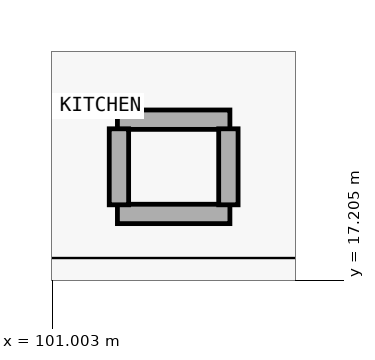
"""IFC4 building model, lengths in metres.
Left out: names, types, materials, properties, quantities, classifications, styles, units other than length and angle.
Written with IfcOpenShell. Run it as: python <this file> out.ifc"""

import sys

from ifc_helpers import new_model, si_unit, direction, frame, frame_2d, origin, place, context, subcontext, project, spatial, rectangle, extrude, element, save


model = new_model("IFC4")
c1 = context("Model", 3, precision=1e-05, world=origin(), true_north=direction((0.0, 1.0)))
c2 = subcontext(c1, "Body", "Model", "MODEL_VIEW")
j1 = project(units=[si_unit("LENGTHUNIT", "METRE"), si_unit("PLANEANGLEUNIT", "RADIAN")], contexts=[c1])
p1 = place(None, origin())
s1 = spatial("IfcSite", under=j1, at=p1, CompositionType="ELEMENT")
p2 = place(p1, origin())
s2 = spatial("IfcBuilding", under=s1, at=p2, CompositionType="ELEMENT")
p3 = place(p2, origin())
s3 = spatial("IfcBuildingStorey", under=s2, at=p3, CompositionType="ELEMENT", Elevation=0.0)
for number, where, z_axis, x_axis in (
    (1, (101.86, 19.32, 0.0), (0.0, 0.0, 1.0), (1.0, 0.0, 0.0)),
    (2, (101.86, 18.08, 0.0), (0.0, 0.0, 1.0), (1.0, 0.0, 0.0)),
):
    element("IfcWall", number, at=place(p3, frame(where, z_axis=z_axis, x_axis=x_axis)), inside=s3, PredefinedType="PARTITIONING", context=c2, shape_type="SweptSolid", body=[
        extrude(rectangle(XDim=1.48, YDim=0.255, at=frame_2d((0.74, 0.0))), origin(), (0.0, 0.0, 1.0), 5.04),
    ])
for number, where, z_axis, x_axis in (
    (3, (101.88, 18.2, 0.0), (0.0, 0.0, 1.0), (0.0, 1.0, 0.0)),
    (4, (103.32, 18.2, 0.0), (0.0, 0.0, 1.0), (0.0, 1.0, 0.0)),
):
    element("IfcWall", number, at=place(p3, frame(where, z_axis=z_axis, x_axis=x_axis)), inside=s3, PredefinedType="PARTITIONING", context=c2, shape_type="SweptSolid", body=[
        extrude(rectangle(XDim=1.0, YDim=0.255, at=frame_2d((0.5, 0.0))), origin(), (0.0, 0.0, 1.0), 5.04),
    ])
save(model, sys.argv[1])
